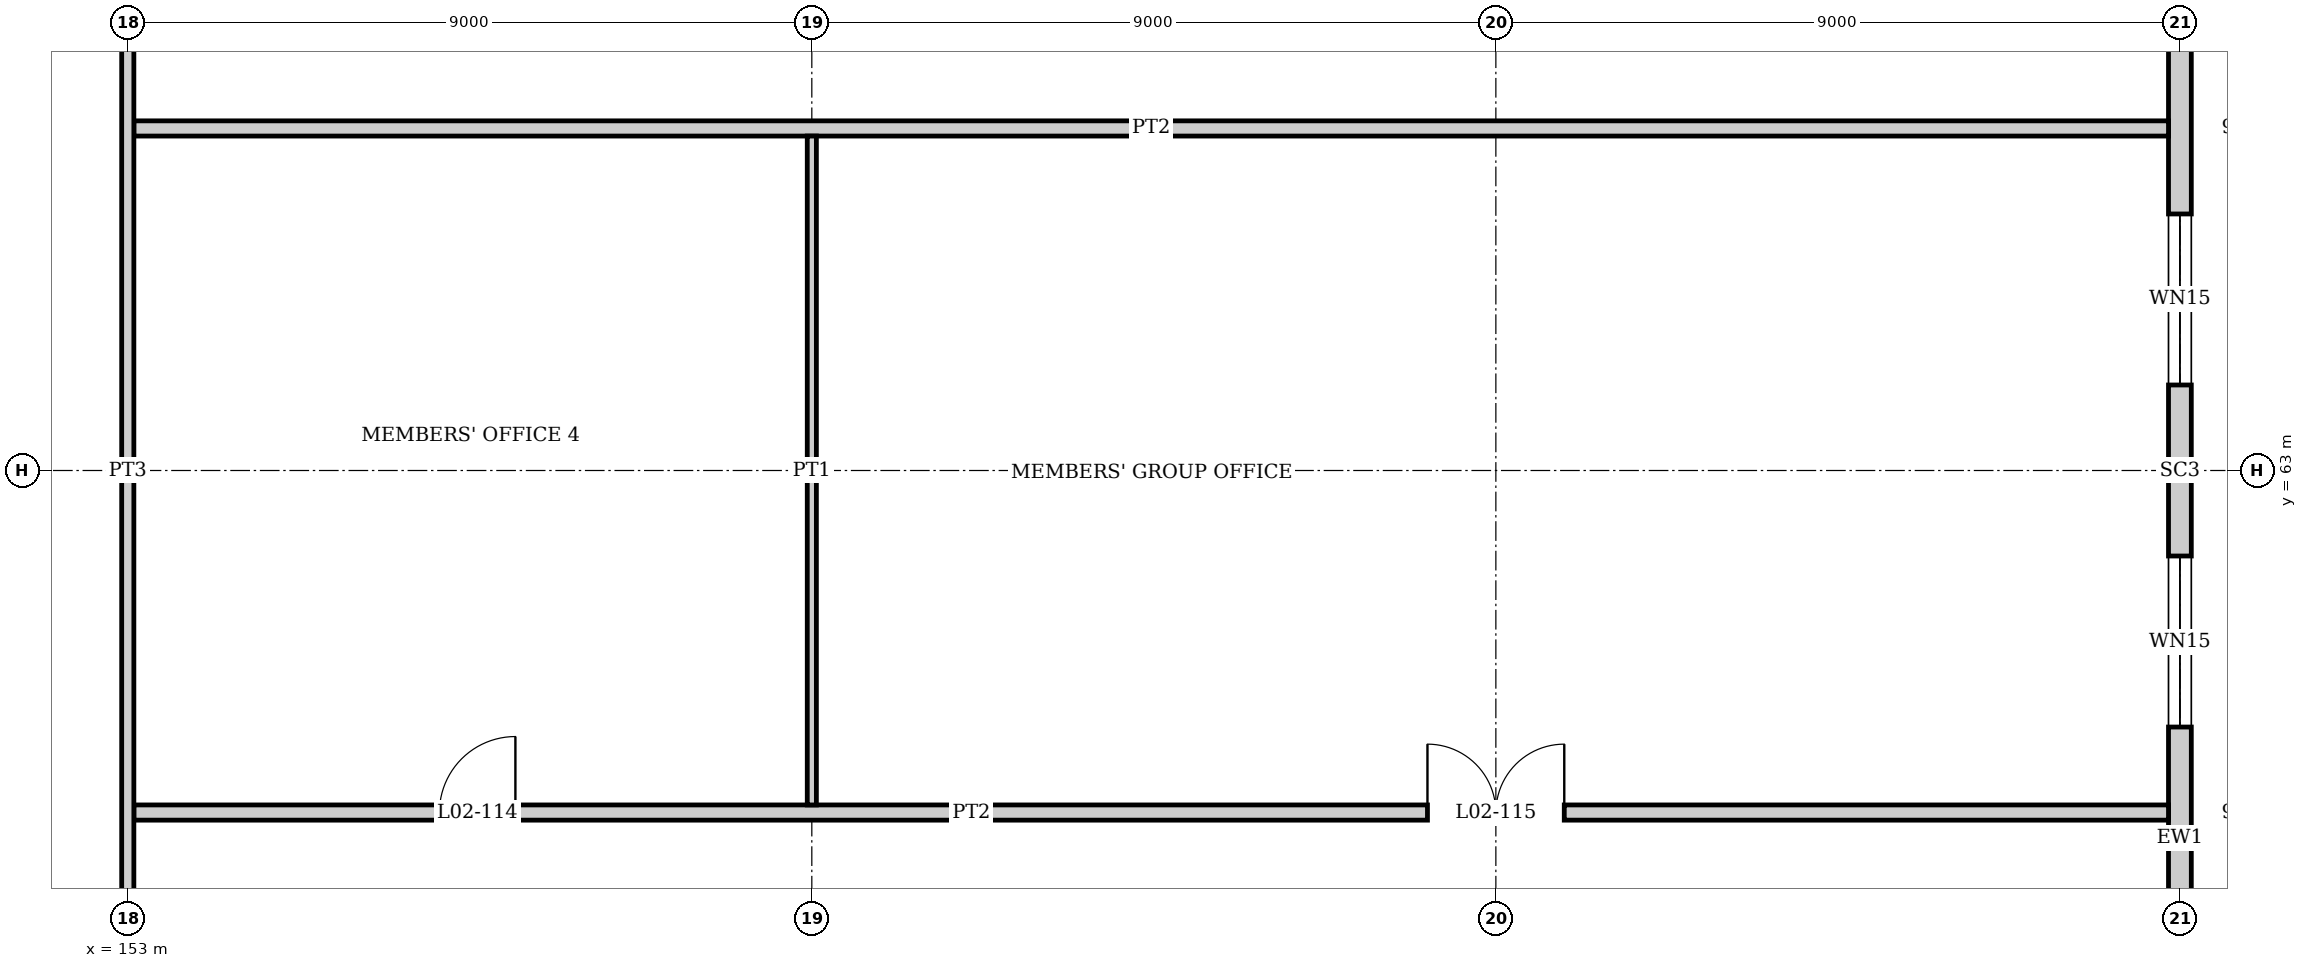
"""IFC4 building model, lengths in metres.
Left out: names, types, materials, properties, quantities, classifications, styles, units other than length and angle.
Written with IfcOpenShell. Run it as: python <this file> out.ifc"""

import sys

from ifc_helpers import new_model, si_unit, direction, frame, frame_2d, origin, origin_2d, place, context, subcontext, project, spatial, rectangle, i_section, extrude, element, fill, save


model = new_model("IFC4")
c1 = context("Model", 3, precision=1e-05, world=origin(), true_north=direction((0.0, 1.0)))
c2 = subcontext(c1, "Body", "Model", "MODEL_VIEW")
j1 = project(units=[si_unit("LENGTHUNIT", "METRE"), si_unit("PLANEANGLEUNIT", "RADIAN")], contexts=[c1])
p1 = place(None, origin())
s1 = spatial("IfcSite", under=j1, at=p1, CompositionType="ELEMENT")
p2 = place(p1, origin())
s2 = spatial("IfcBuilding", under=s1, at=p2, CompositionType="ELEMENT")
p3 = place(p2, frame((0.0, 0.0, 10.5)))
s3 = spatial("IfcBuildingStorey", under=s2, at=p3, CompositionType="ELEMENT", Elevation=10.5)
p4 = place(p3, frame((180.0, 63.0, 0.0), z_axis=(0.0, 0.0, 1.0), x_axis=(0.0, 1.0, 0.0)))
e1 = element("IfcColumn", 1, at=p4, inside=s3, PredefinedType="COLUMN", context=c2, shape_type="SweptSolid", body=[
    extrude(i_section(OverallWidth=0.254, OverallDepth=0.254, WebThickness=0.009, FlangeThickness=0.014, at=origin_2d()), origin(), (0.0, 0.0, 1.0), 4.5),
])
p5 = place(p3, frame((180.0, 54.0, 0.0), z_axis=(0.0, 0.0, 1.0), x_axis=(0.0, 1.0, 0.0)))
e2 = element("IfcWall", 2, at=p5, inside=s3, PredefinedType="SOLIDWALL", context=c2, shape_type="SweptSolid", body=[
    extrude(rectangle(XDim=8.873, YDim=0.3, at=frame_2d((4.437, 0.0))), origin(), (0.0, 0.0, 1.0), 3.991),
])
p6 = place(p5, frame((1.8, 0.0, 0.6)))
e3 = element("IfcOpeningElement", 3, at=p6, cuts=e2, PredefinedType="OPENING", context=c2, shape_type="SweptSolid", body=[
    extrude(rectangle(XDim=0.9, YDim=2.7, at=frame_2d((0.45, 1.35))), frame((0.0, 0.16, 0.0), z_axis=(0.0, -1.0, 0.0), x_axis=(1.0, 0.0, 0.0)), (0.0, 0.0, 1.0), 0.32),
])
p7 = place(p5, frame((5.625, 0.0, 0.9)))
e4 = element("IfcOpeningElement", 4, at=p7, cuts=e2, PredefinedType="OPENING", context=c2, shape_type="SweptSolid", body=[
    extrude(rectangle(XDim=2.25, YDim=1.8, at=frame_2d((1.125, 0.9))), frame((0.0, 0.16, 0.0), z_axis=(0.0, -1.0, 0.0), x_axis=(1.0, 0.0, 0.0)), (0.0, 0.0, 1.0), 0.32),
])
p8 = place(p3, frame((180.0, 63.127, 0.0), z_axis=(0.0, 0.0, 1.0), x_axis=(0.0, 1.0, 0.0)))
e5 = element("IfcWall", 5, at=p8, inside=s3, PredefinedType="SOLIDWALL", context=c2, shape_type="SweptSolid", body=[
    extrude(rectangle(XDim=8.873, YDim=0.3, at=frame_2d((4.437, 0.0))), origin(), (0.0, 0.0, 1.0), 3.991),
])
p9 = place(p8, frame((0.998, 0.0, 0.9)))
e6 = element("IfcOpeningElement", 6, at=p9, cuts=e5, PredefinedType="OPENING", context=c2, shape_type="SweptSolid", body=[
    extrude(rectangle(XDim=2.25, YDim=1.8, at=frame_2d((1.125, 0.9))), frame((0.0, 0.16, 0.0), z_axis=(0.0, -1.0, 0.0), x_axis=(1.0, 0.0, 0.0)), (0.0, 0.0, 1.0), 0.32),
])
p10 = place(p8, frame((6.173, 0.0, 0.6)))
e7 = element("IfcOpeningElement", 7, at=p10, cuts=e5, PredefinedType="OPENING", context=c2, shape_type="SweptSolid", body=[
    extrude(rectangle(XDim=0.9, YDim=2.7, at=frame_2d((0.45, 1.35))), frame((0.0, 0.16, 0.0), z_axis=(0.0, -1.0, 0.0), x_axis=(1.0, 0.0, 0.0)), (0.0, 0.0, 1.0), 0.32),
])
p11 = place(p3, frame((153.08, 58.5, 0.0), z_axis=(0.0, 0.0, 1.0), x_axis=(1.0, 0.0, 0.0)))
e8 = element("IfcWall", 8, at=p11, inside=s3, PredefinedType="PARTITIONING", context=c2, shape_type="SweptSolid", body=[
    extrude(rectangle(XDim=26.77, YDim=0.2, at=frame_2d((13.385, 0.0))), origin(), (0.0, 0.0, 1.0), 3.65),
])
p12 = place(p11, frame((4.02, 0.0, 0.0)))
e9 = element("IfcOpeningElement", 9, at=p12, cuts=e8, PredefinedType="OPENING", context=c2, shape_type="SweptSolid", body=[
    extrude(rectangle(XDim=1.0, YDim=2.1, at=frame_2d((0.5, 1.05))), frame((0.0, 0.11, 0.0), z_axis=(0.0, -1.0, 0.0), x_axis=(1.0, 0.0, 0.0)), (0.0, 0.0, 1.0), 0.22),
])
p13 = place(p11, frame((17.02, 0.0, 0.0)))
e10 = element("IfcOpeningElement", 10, at=p13, cuts=e8, PredefinedType="OPENING", context=c2, shape_type="SweptSolid", body=[
    extrude(rectangle(XDim=1.8, YDim=2.1, at=frame_2d((0.9, 1.05))), frame((0.0, 0.11, 0.0), z_axis=(0.0, -1.0, 0.0), x_axis=(1.0, 0.0, 0.0)), (0.0, 0.0, 1.0), 0.22),
])
p14 = place(p3, frame((153.08, 67.5, 0.0), z_axis=(0.0, 0.0, 1.0), x_axis=(1.0, 0.0, 0.0)))
e11 = element("IfcWall", 11, at=p14, inside=s3, PredefinedType="PARTITIONING", context=c2, shape_type="SweptSolid", body=[
    extrude(rectangle(XDim=26.77, YDim=0.2, at=frame_2d((13.385, 0.0))), origin(), (0.0, 0.0, 1.0), 3.65),
])
p15 = place(p3, frame((153.0, 54.0, 0.0), z_axis=(0.0, 0.0, 1.0), x_axis=(0.0, 1.0, 0.0)))
e12 = element("IfcWall", 12, at=p15, inside=s3, PredefinedType="PARTITIONING", context=c2, shape_type="SweptSolid", body=[
    extrude(rectangle(XDim=17.87, YDim=0.16, at=frame_2d((8.935, 0.0))), origin(), (0.0, 0.0, 1.0), 3.65),
])
p16 = place(p15, frame((1.35, 0.0, 0.0)))
e13 = element("IfcOpeningElement", 13, at=p16, cuts=e12, PredefinedType="OPENING", context=c2, shape_type="SweptSolid", body=[
    extrude(rectangle(XDim=1.8, YDim=2.1, at=frame_2d((0.9, 1.05))), frame((0.0, 0.09, 0.0), z_axis=(0.0, -1.0, 0.0), x_axis=(1.0, 0.0, 0.0)), (0.0, 0.0, 1.0), 0.18),
])
p17 = place(p15, frame((14.85, 0.0, 0.0)))
e14 = element("IfcOpeningElement", 14, at=p17, cuts=e12, PredefinedType="OPENING", context=c2, shape_type="SweptSolid", body=[
    extrude(rectangle(XDim=1.8, YDim=2.1, at=frame_2d((0.9, 1.05))), frame((0.0, 0.09, 0.0), z_axis=(0.0, -1.0, 0.0), x_axis=(1.0, 0.0, 0.0)), (0.0, 0.0, 1.0), 0.18),
])
p18 = place(p3, frame((162.0, 58.6, 0.0), z_axis=(0.0, 0.0, 1.0), x_axis=(0.0, 1.0, 0.0)))
e15 = element("IfcWall", 15, at=p18, inside=s3, PredefinedType="PARTITIONING", context=c2, shape_type="SweptSolid", body=[
    extrude(rectangle(XDim=8.8, YDim=0.12, at=frame_2d((4.4, 0.0))), origin(), (0.0, 0.0, 1.0), 3.65),
])
p19 = place(p7, origin())
e16 = element("IfcWindow", 16, at=p19, inside=s3, PartitioningType="SINGLE_PANEL", PredefinedType="WINDOW", context=c2, shape_type="SweptSolid", body=[
    extrude(rectangle(XDim=2.25, YDim=1.8, at=frame_2d((1.125, 0.9))), frame((0.0, 0.03, 0.0), z_axis=(0.0, -1.0, 0.0), x_axis=(1.0, 0.0, 0.0)), (0.0, 0.0, 1.0), 0.06),
])
fill(e4, e16)
p20 = place(p9, origin())
e17 = element("IfcWindow", 17, at=p20, inside=s3, PartitioningType="SINGLE_PANEL", PredefinedType="WINDOW", context=c2, shape_type="SweptSolid", body=[
    extrude(rectangle(XDim=2.25, YDim=1.8, at=frame_2d((1.125, 0.9))), frame((0.0, 0.03, 0.0), z_axis=(0.0, -1.0, 0.0), x_axis=(1.0, 0.0, 0.0)), (0.0, 0.0, 1.0), 0.06),
])
fill(e6, e17)
p21 = place(p12, origin())
e18 = element("IfcDoor", 18, at=p21, inside=s3, OperationType="SINGLE_SWING_RIGHT", PredefinedType="DOOR", context=c2, shape_type="SweptSolid", body=[
    extrude(rectangle(XDim=1.0, YDim=2.1, at=frame_2d((0.5, 1.05))), frame((0.0, 0.025, 0.0), z_axis=(0.0, -1.0, 0.0), x_axis=(1.0, 0.0, 0.0)), (0.0, 0.0, 1.0), 0.05),
])
fill(e9, e18)
p22 = place(p13, origin())
e19 = element("IfcDoor", 19, at=p22, inside=s3, OperationType="DOUBLE_DOOR_SINGLE_SWING", PredefinedType="DOOR", context=c2, shape_type="SweptSolid", body=[
    extrude(rectangle(XDim=1.8, YDim=2.1, at=frame_2d((0.9, 1.05))), frame((0.0, 0.025, 0.0), z_axis=(0.0, -1.0, 0.0), x_axis=(1.0, 0.0, 0.0)), (0.0, 0.0, 1.0), 0.05),
])
fill(e10, e19)
save(model, sys.argv[1])
